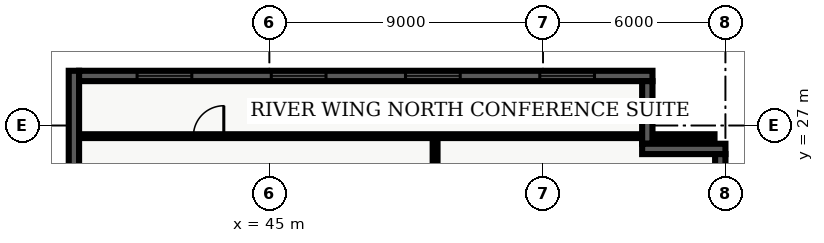
"""IFC4 building model, lengths in metres.
Left out: names, types, materials, properties, quantities, classifications, styles, units other than length and angle.
Written with IfcOpenShell. Run it as: python <this file> out.ifc"""

import sys

from ifc_helpers import new_model, entity, si_unit, converted_unit, direction, frame, origin_with_axes, origin_2d_with_axis, place, context, subcontext, project, spatial, polyline, rectangle, outline, extrude, element, fill, save


model = new_model("IFC4")
c1 = context("Model", 3, precision=1e-05, world=origin_with_axes(), true_north=direction((0.0, 1.0)))
c2 = subcontext(c1, "Body", "Model", "MODEL_VIEW")
j1 = project(units=[si_unit("LENGTHUNIT", "METRE"), converted_unit("PLANEANGLEUNIT", "DEGREE", entity("IfcPlaneAngleMeasure", 0.017), si_unit("PLANEANGLEUNIT", "RADIAN"), dimensions=[0, 0, 0, 0, 0, 0, 0])], contexts=[c1])
p1 = place(None, origin_with_axes())
s1 = spatial("IfcSite", under=j1, at=p1, CompositionType="ELEMENT")
p2 = place(p1, origin_with_axes())
s2 = spatial("IfcBuilding", under=s1, at=p2, CompositionType="ELEMENT")
p3 = place(p2, frame((0.0, 0.0, 132.9), z_axis=(0.0, 0.0, 1.0), x_axis=(1.0, 0.0, 0.0)))
s3 = spatial("IfcBuildingStorey", under=s2, at=p3, CompositionType="ELEMENT", Elevation=132.9)
p4 = place(p3, frame((50.45, 7.85, 0.0), z_axis=(0.0, 0.0, 1.0), x_axis=(0.0, 1.0, 0.0)))
e1 = element("IfcWall", 1, at=p4, inside=s3, PredefinedType="PARTITIONING", context=c2, shape_type="SweptSolid", body=[
    extrude(outline(polyline([(0.0, -0.08), (18.8, -0.08), (18.8, 0.08), (0.0, 0.08), (0.0, -0.08)])), origin_with_axes(), (0.0, 0.0, 1.0), 2.7),
])
p5 = place(p4, frame((7.75, 0.0, 0.0), z_axis=(0.0, 0.0, 1.0), x_axis=(1.0, 0.0, 0.0)))
e2 = element("IfcOpeningElement", 2, at=p5, cuts=e1, PredefinedType="OPENING", context=c2, shape_type="SweptSolid", body=[
    extrude(rectangle(XDim=1.0, YDim=0.18, at=origin_2d_with_axis()), origin_with_axes(), (0.0, 0.0, 1.0), 2.15),
])
p6 = place(p3, frame((38.735, 26.65, 0.0), z_axis=(0.0, 0.0, 1.0), x_axis=(1.0, 0.0, 0.0)))
e3 = element("IfcWall", 3, at=p6, inside=s3, PredefinedType="PARTITIONING", context=c2, shape_type="SweptSolid", body=[
    extrude(outline(polyline([(0.0, -0.062), (20.905, -0.062), (20.905, 0.062), (0.0, 0.062), (0.0, -0.062)])), origin_with_axes(), (0.0, 0.0, 1.0), 2.7),
])
p7 = place(p6, frame((4.265, 0.0, 0.0), z_axis=(0.0, 0.0, 1.0), x_axis=(1.0, 0.0, 0.0)))
e4 = element("IfcOpeningElement", 4, at=p7, cuts=e3, PredefinedType="OPENING", context=c2, shape_type="SweptSolid", body=[
    extrude(rectangle(XDim=1.0, YDim=0.145, at=origin_2d_with_axis()), origin_with_axes(), (0.0, 0.0, 1.0), 2.15),
])
p8 = place(p3, frame((38.57, 21.26, 0.0), z_axis=(0.0, 0.0, 1.0), x_axis=(0.0, 1.0, 0.0)))
e5 = element("IfcWall", 5, at=p8, inside=s3, PredefinedType="SOLIDWALL", context=c2, shape_type="SweptSolid", body=[
    extrude(outline(polyline([(0.0, -0.17), (7.54, -0.17), (7.54, 0.17), (0.0, 0.17), (0.0, -0.17)])), origin_with_axes(), (0.0, 0.0, 1.0), 3.66),
])
p9 = place(p3, frame((38.74, 28.63, 0.0), z_axis=(0.0, 0.0, 1.0), x_axis=(1.0, 0.0, 0.0)))
e6 = element("IfcWall", 6, at=p9, inside=s3, PredefinedType="SOLIDWALL", context=c2, shape_type="SweptSolid", body=[
    extrude(outline(polyline([(0.0, -0.17), (18.86, -0.17), (18.86, 0.17), (0.0, 0.17), (0.0, -0.17)])), origin_with_axes(), (0.0, 0.0, 1.0), 3.66),
])
p10 = place(p9, frame((2.808, 0.0, 0.45), z_axis=(0.0, 0.0, 1.0), x_axis=(1.0, 0.0, 0.0)))
e7 = element("IfcOpeningElement", 7, at=p10, cuts=e6, PredefinedType="OPENING", context=c2, shape_type="SweptSolid", body=[
    extrude(rectangle(XDim=1.8, YDim=0.36, at=origin_2d_with_axis()), origin_with_axes(), (0.0, 0.0, 1.0), 2.1),
])
p11 = place(p9, frame((7.222, 0.0, 0.45), z_axis=(0.0, 0.0, 1.0), x_axis=(1.0, 0.0, 0.0)))
e8 = element("IfcOpeningElement", 8, at=p11, cuts=e6, PredefinedType="OPENING", context=c2, shape_type="SweptSolid", body=[
    extrude(rectangle(XDim=1.8, YDim=0.36, at=origin_2d_with_axis()), origin_with_axes(), (0.0, 0.0, 1.0), 2.1),
])
p12 = place(p9, frame((11.637, 0.0, 0.45), z_axis=(0.0, 0.0, 1.0), x_axis=(1.0, 0.0, 0.0)))
e9 = element("IfcOpeningElement", 9, at=p12, cuts=e6, PredefinedType="OPENING", context=c2, shape_type="SweptSolid", body=[
    extrude(rectangle(XDim=1.8, YDim=0.36, at=origin_2d_with_axis()), origin_with_axes(), (0.0, 0.0, 1.0), 2.1),
])
p13 = place(p9, frame((16.053, 0.0, 0.45), z_axis=(0.0, 0.0, 1.0), x_axis=(1.0, 0.0, 0.0)))
e10 = element("IfcOpeningElement", 10, at=p13, cuts=e6, PredefinedType="OPENING", context=c2, shape_type="SweptSolid", body=[
    extrude(rectangle(XDim=1.8, YDim=0.36, at=origin_2d_with_axis()), origin_with_axes(), (0.0, 0.0, 1.0), 2.1),
])
p14 = place(p3, frame((57.43, 28.46, 0.0), z_axis=(0.0, 0.0, 1.0), x_axis=(0.0, -1.0, 0.0)))
e11 = element("IfcWall", 11, at=p14, inside=s3, PredefinedType="SOLIDWALL", context=c2, shape_type="SweptSolid", body=[
    extrude(outline(polyline([(0.0, -0.17), (2.06, -0.17), (2.06, 0.17), (0.0, 0.17), (0.0, -0.17)])), origin_with_axes(), (0.0, 0.0, 1.0), 3.66),
])
p15 = place(p3, frame((57.26, 26.23, 0.0), z_axis=(0.0, 0.0, 1.0), x_axis=(1.0, 0.0, 0.0)))
e12 = element("IfcWall", 12, at=p15, inside=s3, PredefinedType="SOLIDWALL", context=c2, shape_type="SweptSolid", body=[
    extrude(outline(polyline([(0.0, -0.17), (2.74, -0.17), (2.74, 0.17), (0.0, 0.17), (0.0, -0.17)])), origin_with_axes(), (0.0, 0.0, 1.0), 3.66),
])
p16 = place(p3, frame((59.83, 26.06, 0.0), z_axis=(0.0, 0.0, 1.0), x_axis=(0.0, -1.0, 0.0)))
e13 = element("IfcWall", 13, at=p16, inside=s3, PredefinedType="SOLIDWALL", context=c2, shape_type="SweptSolid", body=[
    extrude(outline(polyline([(0.0, -0.17), (23.66, -0.17), (23.66, 0.17), (0.0, 0.17), (0.0, -0.17)])), origin_with_axes(), (0.0, 0.0, 1.0), 3.66),
])
p17 = place(p16, frame((3.696, 0.0, 0.45), z_axis=(0.0, 0.0, 1.0), x_axis=(1.0, 0.0, 0.0)))
e14 = element("IfcOpeningElement", 14, at=p17, cuts=e13, PredefinedType="OPENING", context=c2, shape_type="SweptSolid", body=[
    extrude(rectangle(XDim=1.8, YDim=0.36, at=origin_2d_with_axis()), origin_with_axes(), (0.0, 0.0, 1.0), 2.1),
])
p18 = place(p16, frame((11.83, 0.0, 0.45), z_axis=(0.0, 0.0, 1.0), x_axis=(1.0, 0.0, 0.0)))
e15 = element("IfcOpeningElement", 15, at=p18, cuts=e13, PredefinedType="OPENING", context=c2, shape_type="SweptSolid", body=[
    extrude(rectangle(XDim=1.8, YDim=0.36, at=origin_2d_with_axis()), origin_with_axes(), (0.0, 0.0, 1.0), 2.1),
])
p19 = place(p16, frame((20.364, 0.0, 0.45), z_axis=(0.0, 0.0, 1.0), x_axis=(1.0, 0.0, 0.0)))
e16 = element("IfcOpeningElement", 16, at=p19, cuts=e13, PredefinedType="OPENING", context=c2, shape_type="SweptSolid", body=[
    extrude(rectangle(XDim=1.8, YDim=0.36, at=origin_2d_with_axis()), origin_with_axes(), (0.0, 0.0, 1.0), 2.1),
])
p20 = place(p6, frame((4.265, 0.0, 0.0), z_axis=(0.0, 0.0, 1.0), x_axis=(1.0, 0.0, 0.0)))
e17 = element("IfcDoor", 17, at=p20, inside=s3, OperationType="SINGLE_SWING_RIGHT", PredefinedType="DOOR", context=c2, shape_type="SweptSolid", body=[
    extrude(rectangle(XDim=1.0, YDim=0.075, at=origin_2d_with_axis()), origin_with_axes(), (0.0, 0.0, 1.0), 2.15),
])
fill(e4, e17)
p21 = place(p9, frame((2.808, 0.0, 0.45), z_axis=(0.0, 0.0, 1.0), x_axis=(1.0, 0.0, 0.0)))
e18 = element("IfcWindow", 18, at=p21, inside=s3, PredefinedType="WINDOW", context=c2, shape_type="SweptSolid", body=[
    extrude(rectangle(XDim=1.8, YDim=0.09, at=origin_2d_with_axis()), origin_with_axes(), (0.0, 0.0, 1.0), 2.1),
])
fill(e7, e18)
p22 = place(p9, frame((7.222, 0.0, 0.45), z_axis=(0.0, 0.0, 1.0), x_axis=(1.0, 0.0, 0.0)))
e19 = element("IfcWindow", 19, at=p22, inside=s3, PredefinedType="WINDOW", context=c2, shape_type="SweptSolid", body=[
    extrude(rectangle(XDim=1.8, YDim=0.09, at=origin_2d_with_axis()), origin_with_axes(), (0.0, 0.0, 1.0), 2.1),
])
fill(e8, e19)
p23 = place(p9, frame((11.637, 0.0, 0.45), z_axis=(0.0, 0.0, 1.0), x_axis=(1.0, 0.0, 0.0)))
e20 = element("IfcWindow", 20, at=p23, inside=s3, PredefinedType="WINDOW", context=c2, shape_type="SweptSolid", body=[
    extrude(rectangle(XDim=1.8, YDim=0.09, at=origin_2d_with_axis()), origin_with_axes(), (0.0, 0.0, 1.0), 2.1),
])
fill(e9, e20)
p24 = place(p9, frame((16.053, 0.0, 0.45), z_axis=(0.0, 0.0, 1.0), x_axis=(1.0, 0.0, 0.0)))
e21 = element("IfcWindow", 21, at=p24, inside=s3, PredefinedType="WINDOW", context=c2, shape_type="SweptSolid", body=[
    extrude(rectangle(XDim=1.8, YDim=0.09, at=origin_2d_with_axis()), origin_with_axes(), (0.0, 0.0, 1.0), 2.1),
])
fill(e10, e21)
save(model, sys.argv[1])
